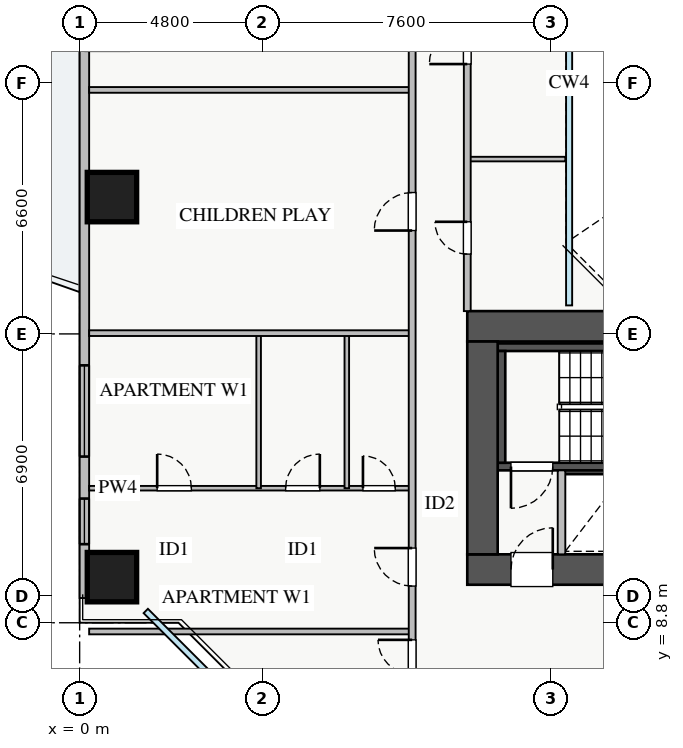
"""IFC4 building model, lengths in metres.
Left out: names, types, materials, properties, quantities, classifications, styles, units other than length and angle.
Written with IfcOpenShell. Run it as: python <this file> out.ifc"""

import sys

from ifc_helpers import new_model, si_unit, direction, frame, frame_2d, origin, origin_2d, place, context, subcontext, project, spatial, rectangle, extrude, source, transform, mapped, element, fill, save


model = new_model("IFC4")
c1 = context("Model", 3, precision=1e-05, world=origin(), true_north=direction((0.0, 1.0)))
c2 = subcontext(c1, "Body", "Model", "MODEL_VIEW")
j1 = project(units=[si_unit("LENGTHUNIT", "METRE"), si_unit("PLANEANGLEUNIT", "RADIAN")], contexts=[c1])
p1 = place(None, origin())
s1 = spatial("IfcSite", under=j1, at=p1, CompositionType="ELEMENT")
p2 = place(p1, origin())
s2 = spatial("IfcBuilding", under=s1, at=p2, CompositionType="ELEMENT")
p3 = place(p2, frame((0.0, 0.0, 60.0)))
s3 = spatial("IfcBuildingStorey", under=s2, at=p3, CompositionType="ELEMENT", Elevation=60.0)
p4 = place(p3, frame((12.68, 12.8, 0.0), z_axis=(0.0, 0.0, 1.0), x_axis=(1.0, 0.0, 0.0)))
e1 = element("IfcWall", 1, at=p4, inside=s3, PredefinedType="SHEAR", context=c2, shape_type="SweptSolid", body=[
    extrude(rectangle(XDim=1.94, YDim=0.18, at=frame_2d((0.97, 0.0))), origin(), (0.0, 0.0, 1.0), 3.07),
])
p5 = place(p3, frame((11.0, 12.91, 0.0), z_axis=(0.0, 0.0, 1.0), x_axis=(1.0, 0.0, 0.0)))
e2 = element("IfcWall", 2, at=p5, inside=s3, PredefinedType="SHEAR", context=c2, shape_type="SweptSolid", body=[
    extrude(rectangle(XDim=7.15, YDim=0.2, at=frame_2d((3.575, 0.0))), origin(), (0.0, 0.0, 1.0), 3.25),
])
p6 = place(p5, frame((0.35, 0.0, 0.0)))
e3 = element("IfcOpeningElement", 3, at=p6, cuts=e2, PredefinedType="OPENING", context=c2, shape_type="SweptSolid", body=[
    extrude(rectangle(XDim=1.1, YDim=2.05, at=frame_2d((0.55, 1.025))), frame((0.0, 0.11, 0.0), z_axis=(0.0, -1.0, 0.0), x_axis=(1.0, 0.0, 0.0)), (0.0, 0.0, 1.0), 0.22),
])
p7 = place(p3, frame((11.0, 16.05, 0.0), z_axis=(0.0, 0.0, 1.0), x_axis=(1.0, 0.0, 0.0)))
e4 = element("IfcWall", 4, at=p7, inside=s3, PredefinedType="SHEAR", context=c2, shape_type="SweptSolid", body=[
    extrude(rectangle(XDim=7.15, YDim=0.2, at=frame_2d((3.575, 0.0))), origin(), (0.0, 0.0, 1.0), 3.25),
])
p8 = place(p3, frame((11.1, 13.01, 0.0), z_axis=(0.0, 0.0, 1.0), x_axis=(0.0, 1.0, 0.0)))
e5 = element("IfcWall", 5, at=p8, inside=s3, PredefinedType="SHEAR", context=c2, shape_type="SweptSolid", body=[
    extrude(rectangle(XDim=2.94, YDim=0.2, at=frame_2d((1.47, 0.0))), origin(), (0.0, 0.0, 1.0), 3.25),
])
p9 = place(p3, frame((10.2, 10.2, 0.0), z_axis=(0.0, 0.0, 1.0), x_axis=(1.0, 0.0, 0.0)))
e6 = element("IfcWall", 6, at=p9, inside=s3, PredefinedType="SHEAR", context=c2, shape_type="SweptSolid", body=[
    extrude(rectangle(XDim=17.6, YDim=0.8, at=frame_2d((8.8, 0.0))), origin(), (0.0, 0.0, 1.0), 3.25),
])
p10 = place(p9, frame((1.15, 0.0, 0.0)))
e7 = element("IfcOpeningElement", 7, at=p10, cuts=e6, PredefinedType="OPENING", context=c2, shape_type="SweptSolid", body=[
    extrude(rectangle(XDim=1.1, YDim=2.05, at=frame_2d((0.55, 1.025))), frame((0.0, 0.41, 0.0), z_axis=(0.0, -1.0, 0.0), x_axis=(1.0, 0.0, 0.0)), (0.0, 0.0, 1.0), 0.82),
])
p11 = place(p9, frame((8.3, 0.0, 0.0)))
e8 = element("IfcOpeningElement", 8, at=p11, cuts=e6, PredefinedType="OPENING", context=c2, shape_type="SweptSolid", body=[
    extrude(rectangle(XDim=1.1, YDim=2.05, at=frame_2d((0.55, 1.025))), frame((0.0, 0.41, 0.0), z_axis=(0.0, -1.0, 0.0), x_axis=(1.0, 0.0, 0.0)), (0.0, 0.0, 1.0), 0.82),
])
p12 = place(p9, frame((10.05, 0.0, 0.0)))
e9 = element("IfcOpeningElement", 9, at=p12, cuts=e6, PredefinedType="OPENING", context=c2, shape_type="SweptSolid", body=[
    extrude(rectangle(XDim=1.1, YDim=2.05, at=frame_2d((0.55, 1.025))), frame((0.0, 0.41, 0.0), z_axis=(0.0, -1.0, 0.0), x_axis=(1.0, 0.0, 0.0)), (0.0, 0.0, 1.0), 0.82),
])
p13 = place(p9, frame((14.74, 0.0, 0.0)))
e10 = element("IfcOpeningElement", 10, at=p13, cuts=e6, PredefinedType="OPENING", context=c2, shape_type="SweptSolid", body=[
    extrude(rectangle(XDim=1.0, YDim=2.05, at=frame_2d((0.5, 1.025))), frame((0.0, 0.41, 0.0), z_axis=(0.0, -1.0, 0.0), x_axis=(1.0, 0.0, 0.0)), (0.0, 0.0, 1.0), 0.82),
])
p14 = place(p9, frame((12.585, 0.0, 0.0)))
e11 = element("IfcOpeningElement", 11, at=p14, cuts=e6, PredefinedType="OPENING", context=c2, shape_type="SweptSolid", body=[
    extrude(rectangle(XDim=1.0, YDim=2.05, at=frame_2d((0.5, 1.025))), frame((0.0, 0.41, 0.0), z_axis=(0.0, -1.0, 0.0), x_axis=(1.0, 0.0, 0.0)), (0.0, 0.0, 1.0), 0.82),
])
p15 = place(p3, frame((10.2, 16.6, 0.0), z_axis=(0.0, 0.0, 1.0), x_axis=(1.0, 0.0, 0.0)))
e12 = element("IfcWall", 12, at=p15, inside=s3, PredefinedType="SHEAR", context=c2, shape_type="SweptSolid", body=[
    extrude(rectangle(XDim=17.6, YDim=0.8, at=frame_2d((8.8, 0.0))), origin(), (0.0, 0.0, 1.0), 3.25),
])
p16 = place(p3, frame((10.6, 10.6, 0.0), z_axis=(0.0, 0.0, 1.0), x_axis=(0.0, 1.0, 0.0)))
e13 = element("IfcWall", 13, at=p16, inside=s3, PredefinedType="SHEAR", context=c2, shape_type="SweptSolid", body=[
    extrude(rectangle(XDim=5.6, YDim=0.8, at=frame_2d((2.8, 0.0))), origin(), (0.0, 0.0, 1.0), 3.25),
])
m1 = source(origin(), c2, "Body", "SweptSolid", [
    extrude(rectangle(XDim=1.3, YDim=1.3, at=origin_2d()), origin(), (0.0, 0.0, 1.0), 3.25),
])
for number, where, z_axis, x_axis in (
    (14, (0.85, 20.0, 0.0), (0.0, 0.0, 1.0), (1.0, 0.0, 0.0)),
    (15, (0.85, 10.0, 0.0), (0.0, 0.0, 1.0), (1.0, 0.0, 0.0)),
):
    element("IfcColumn", number, at=place(p3, frame(where, z_axis=z_axis, x_axis=x_axis)), inside=s3, PredefinedType="COLUMN", context=c2, shape_type="MappedRepresentation", body=[
        mapped(m1, transform((0.0, 0.0, 0.0), x_axis=(1.0, 0.0, 0.0), y_axis=(0.0, 1.0, 0.0), z_axis=(0.0, 0.0, 1.0), scale=1.0)),
    ])
p17 = place(p3, frame((0.125, 9.45, 0.0), z_axis=(0.0, 0.0, 1.0), x_axis=(0.0, 1.0, 0.0)))
e16 = element("IfcWall", 16, at=p17, inside=s3, PredefinedType="STANDARD", context=c2, shape_type="SweptSolid", body=[
    extrude(rectangle(XDim=27.1, YDim=0.25, at=frame_2d((13.55, 0.0))), origin(), (0.0, 0.0, 1.0), 2.61),
])
p18 = place(p17, frame((14.4, 0.0, 0.0)))
e17 = element("IfcOpeningElement", 17, at=p18, cuts=e16, PredefinedType="OPENING", context=c2, shape_type="SweptSolid", body=[
    extrude(rectangle(XDim=1.2, YDim=2.1, at=frame_2d((0.6, 1.05))), frame((0.0, 0.135, 0.0), z_axis=(0.0, -1.0, 0.0), x_axis=(1.0, 0.0, 0.0)), (0.0, 0.0, 1.0), 0.27),
])
p19 = place(p17, frame((1.417, 0.0, 0.9)))
e18 = element("IfcOpeningElement", 18, at=p19, cuts=e16, PredefinedType="OPENING", context=c2, shape_type="SweptSolid", body=[
    extrude(rectangle(XDim=1.2, YDim=1.4, at=frame_2d((0.6, 0.7))), frame((0.0, 0.135, 0.0), z_axis=(0.0, -1.0, 0.0), x_axis=(1.0, 0.0, 0.0)), (0.0, 0.0, 1.0), 0.27),
])
p20 = place(p17, frame((24.188, 0.0, 0.9)))
e19 = element("IfcOpeningElement", 19, at=p20, cuts=e16, PredefinedType="OPENING", context=c2, shape_type="SweptSolid", body=[
    extrude(rectangle(XDim=1.5, YDim=1.5, at=frame_2d((0.75, 0.75))), frame((0.0, 0.135, 0.0), z_axis=(0.0, -1.0, 0.0), x_axis=(1.0, 0.0, 0.0)), (0.0, 0.0, 1.0), 0.27),
])
p21 = place(p17, frame((3.722, 0.0, 0.9)))
e20 = element("IfcOpeningElement", 20, at=p21, cuts=e16, PredefinedType="OPENING", context=c2, shape_type="SweptSolid", body=[
    extrude(rectangle(XDim=2.4, YDim=1.5, at=frame_2d((1.2, 0.75))), frame((0.0, 0.135, 0.0), z_axis=(0.0, -1.0, 0.0), x_axis=(1.0, 0.0, 0.0)), (0.0, 0.0, 1.0), 0.27),
])
p22 = place(p17, frame((21.018, 0.0, 0.9)))
e21 = element("IfcOpeningElement", 21, at=p22, cuts=e16, PredefinedType="OPENING", context=c2, shape_type="SweptSolid", body=[
    extrude(rectangle(XDim=2.4, YDim=1.5, at=frame_2d((1.2, 0.75))), frame((0.0, 0.135, 0.0), z_axis=(0.0, -1.0, 0.0), x_axis=(1.0, 0.0, 0.0)), (0.0, 0.0, 1.0), 0.27),
])
p23 = place(p17, frame((18.6, 0.0, 0.9)))
e22 = element("IfcOpeningElement", 22, at=p23, cuts=e16, PredefinedType="OPENING", context=c2, shape_type="SweptSolid", body=[
    extrude(rectangle(XDim=0.9, YDim=1.2, at=frame_2d((0.45, 0.6))), frame((0.0, 0.135, 0.0), z_axis=(0.0, -1.0, 0.0), x_axis=(1.0, 0.0, 0.0)), (0.0, 0.0, 1.0), 0.27),
])
p24 = place(p3, frame((12.68, 10.6, 0.0), z_axis=(0.0, 0.0, 1.0), x_axis=(0.0, 1.0, 0.0)))
e23 = element("IfcWall", 23, at=p24, inside=s3, PredefinedType="PARTITIONING", context=c2, shape_type="SweptSolid", body=[
    extrude(rectangle(XDim=2.21, YDim=0.2, at=frame_2d((1.105, 0.0))), origin(), (0.0, 0.0, 1.0), 3.07),
])
p25 = place(p3, frame((0.25, 8.57, 0.0), z_axis=(0.0, 0.0, 1.0), x_axis=(1.0, 0.0, 0.0)))
e24 = element("IfcWall", 24, at=p25, inside=s3, PredefinedType="PARTITIONING", context=c2, shape_type="SweptSolid", body=[
    extrude(rectangle(XDim=8.5, YDim=0.15, at=frame_2d((4.25, 0.0))), origin(), (0.0, 0.0, 1.0), 3.07),
])
p26 = place(p3, frame((0.25, 12.34, 0.0), z_axis=(0.0, 0.0, 1.0), x_axis=(1.0, 0.0, 0.0)))
e25 = element("IfcWall", 25, at=p26, inside=s3, PredefinedType="PLUMBINGWALL", context=c2, shape_type="SweptSolid", body=[
    extrude(rectangle(XDim=8.5, YDim=0.12, at=frame_2d((4.25, 0.0))), origin(), (0.0, 0.0, 1.0), 3.07),
])
p27 = place(p26, frame((1.79, 0.0, 0.0)))
e26 = element("IfcOpeningElement", 26, at=p27, cuts=e25, PredefinedType="OPENING", context=c2, shape_type="SweptSolid", body=[
    extrude(rectangle(XDim=0.9, YDim=2.05, at=frame_2d((0.45, 1.025))), frame((0.0, 0.07, 0.0), z_axis=(0.0, -1.0, 0.0), x_axis=(1.0, 0.0, 0.0)), (0.0, 0.0, 1.0), 0.14),
])
p28 = place(p26, frame((5.17, 0.0, 0.0)))
e27 = element("IfcOpeningElement", 27, at=p28, cuts=e25, PredefinedType="OPENING", context=c2, shape_type="SweptSolid", body=[
    extrude(rectangle(XDim=0.9, YDim=2.05, at=frame_2d((0.45, 1.025))), frame((0.0, 0.07, 0.0), z_axis=(0.0, -1.0, 0.0), x_axis=(1.0, 0.0, 0.0)), (0.0, 0.0, 1.0), 0.14),
])
p29 = place(p26, frame((7.205, 0.0, 0.0)))
e28 = element("IfcOpeningElement", 28, at=p29, cuts=e25, PredefinedType="OPENING", context=c2, shape_type="SweptSolid", body=[
    extrude(rectangle(XDim=0.85, YDim=2.05, at=frame_2d((0.425, 1.025))), frame((0.0, 0.07, 0.0), z_axis=(0.0, -1.0, 0.0), x_axis=(1.0, 0.0, 0.0)), (0.0, 0.0, 1.0), 0.14),
])
for number, where, z_axis, x_axis in (
    (29, (4.71, 12.34, 0.0), (0.0, 0.0, 1.0), (0.0, 1.0, 0.0)),
    (30, (7.03, 12.34, 0.0), (0.0, 0.0, 1.0), (0.0, 1.0, 0.0)),
):
    element("IfcWall", number, at=place(p3, frame(where, z_axis=z_axis, x_axis=x_axis)), inside=s3, PredefinedType="PLUMBINGWALL", context=c2, shape_type="SweptSolid", body=[
        extrude(rectangle(XDim=4.08, YDim=0.12, at=frame_2d((2.04, 0.0))), origin(), (0.0, 0.0, 1.0), 3.07),
    ])
for number, where, z_axis, x_axis in (
    (31, (0.25, 16.42, 0.0), (0.0, 0.0, 1.0), (1.0, 0.0, 0.0)),
    (32, (0.25, 22.82, 0.0), (0.0, 0.0, 1.0), (1.0, 0.0, 0.0)),
):
    element("IfcWall", number, at=place(p3, frame(where, z_axis=z_axis, x_axis=x_axis)), inside=s3, PredefinedType="PARTITIONING", context=c2, shape_type="SweptSolid", body=[
        extrude(rectangle(XDim=8.5, YDim=0.15, at=frame_2d((4.25, 0.0))), origin(), (0.0, 0.0, 1.0), 3.07),
    ])
p30 = place(p3, frame((8.75, 7.21, 0.0), z_axis=(0.0, 0.0, 1.0), x_axis=(0.0, 1.0, 0.0)))
e33 = element("IfcWall", 33, at=p30, inside=s3, PredefinedType="PARTITIONING", context=c2, shape_type="SweptSolid", body=[
    extrude(rectangle(XDim=31.23, YDim=0.18, at=frame_2d((15.615, 0.0))), origin(), (0.0, 0.0, 1.0), 3.07),
])
p31 = place(p30, frame((30.09, 0.0, 0.0)))
e34 = element("IfcOpeningElement", 34, at=p31, cuts=e33, PredefinedType="OPENING", context=c2, shape_type="SweptSolid", body=[
    extrude(rectangle(XDim=0.9, YDim=2.05, at=frame_2d((0.45, 1.025))), frame((0.0, 0.1, 0.0), z_axis=(0.0, -1.0, 0.0), x_axis=(1.0, 0.0, 0.0)), (0.0, 0.0, 1.0), 0.2),
])
p32 = place(p30, frame((0.24, 0.0, 0.0)))
e35 = element("IfcOpeningElement", 35, at=p32, cuts=e33, PredefinedType="OPENING", context=c2, shape_type="SweptSolid", body=[
    extrude(rectangle(XDim=0.9, YDim=2.05, at=frame_2d((0.45, 1.025))), frame((0.0, 0.1, 0.0), z_axis=(0.0, -1.0, 0.0), x_axis=(1.0, 0.0, 0.0)), (0.0, 0.0, 1.0), 0.2),
])
p33 = place(p30, frame((2.555, 0.0, 0.0)))
e36 = element("IfcOpeningElement", 36, at=p33, cuts=e33, PredefinedType="OPENING", context=c2, shape_type="SweptSolid", body=[
    extrude(rectangle(XDim=1.0, YDim=2.05, at=frame_2d((0.5, 1.025))), frame((0.0, 0.1, 0.0), z_axis=(0.0, -1.0, 0.0), x_axis=(1.0, 0.0, 0.0)), (0.0, 0.0, 1.0), 0.2),
])
p34 = place(p30, frame((11.91, 0.0, 0.0)))
e37 = element("IfcOpeningElement", 37, at=p34, cuts=e33, PredefinedType="OPENING", context=c2, shape_type="SweptSolid", body=[
    extrude(rectangle(XDim=1.0, YDim=2.05, at=frame_2d((0.5, 1.025))), frame((0.0, 0.1, 0.0), z_axis=(0.0, -1.0, 0.0), x_axis=(1.0, 0.0, 0.0)), (0.0, 0.0, 1.0), 0.2),
])
p35 = place(p30, frame((17.425, 0.0, 0.0)))
e38 = element("IfcOpeningElement", 38, at=p35, cuts=e33, PredefinedType="OPENING", context=c2, shape_type="SweptSolid", body=[
    extrude(rectangle(XDim=1.0, YDim=2.05, at=frame_2d((0.5, 1.025))), frame((0.0, 0.1, 0.0), z_axis=(0.0, -1.0, 0.0), x_axis=(1.0, 0.0, 0.0)), (0.0, 0.0, 1.0), 0.2),
])
p36 = place(p30, frame((23.76, 0.0, 0.0)))
e39 = element("IfcOpeningElement", 39, at=p36, cuts=e33, PredefinedType="OPENING", context=c2, shape_type="SweptSolid", body=[
    extrude(rectangle(XDim=1.0, YDim=2.05, at=frame_2d((0.5, 1.025))), frame((0.0, 0.1, 0.0), z_axis=(0.0, -1.0, 0.0), x_axis=(1.0, 0.0, 0.0)), (0.0, 0.0, 1.0), 0.2),
])
p37 = place(p3, frame((10.2, 21.0, 0.0), z_axis=(0.0, 0.0, 1.0), x_axis=(1.0, 0.0, 0.0)))
e40 = element("IfcWall", 40, at=p37, inside=s3, PredefinedType="PLUMBINGWALL", context=c2, shape_type="SweptSolid", body=[
    extrude(rectangle(XDim=2.58, YDim=0.12, at=frame_2d((1.29, 0.0))), origin(), (0.0, 0.0, 1.0), 3.07),
])
p38 = place(p3, frame((10.2, 17.0, 0.0), z_axis=(0.0, 0.0, 1.0), x_axis=(0.0, 1.0, 0.0)))
e41 = element("IfcWall", 41, at=p38, inside=s3, PredefinedType="PARTITIONING", context=c2, shape_type="SweptSolid", body=[
    extrude(rectangle(XDim=12.0, YDim=0.18, at=frame_2d((6.0, 0.0))), origin(), (0.0, 0.0, 1.0), 3.07),
])
p39 = place(p38, frame((1.5, 0.0, 0.0)))
e42 = element("IfcOpeningElement", 42, at=p39, cuts=e41, PredefinedType="OPENING", context=c2, shape_type="SweptSolid", body=[
    extrude(rectangle(XDim=0.85, YDim=2.05, at=frame_2d((0.425, 1.025))), frame((0.0, 0.1, 0.0), z_axis=(0.0, -1.0, 0.0), x_axis=(1.0, 0.0, 0.0)), (0.0, 0.0, 1.0), 0.2),
])
p40 = place(p38, frame((6.5, 0.0, 0.0)))
e43 = element("IfcOpeningElement", 43, at=p40, cuts=e41, PredefinedType="OPENING", context=c2, shape_type="SweptSolid", body=[
    extrude(rectangle(XDim=1.0, YDim=2.05, at=frame_2d((0.5, 1.025))), frame((0.0, 0.1, 0.0), z_axis=(0.0, -1.0, 0.0), x_axis=(1.0, 0.0, 0.0)), (0.0, 0.0, 1.0), 0.2),
])
m2 = source(origin(), c2, "Body", "SweptSolid", [
    extrude(rectangle(XDim=1.2, YDim=1.4, at=frame_2d((0.6, 0.7))), frame((0.0, 0.03, 0.0), z_axis=(0.0, -1.0, 0.0), x_axis=(1.0, 0.0, 0.0)), (0.0, 0.0, 1.0), 0.06),
])
p41 = place(p19, origin())
e44 = element("IfcWindow", 44, at=p41, inside=s3, PartitioningType="TRIPLE_PANEL_VERTICAL", PredefinedType="WINDOW", context=c2, shape_type="MappedRepresentation", body=[
    mapped(m2, transform((0.0, 0.0, 0.0), x_axis=(1.0, 0.0, 0.0), y_axis=(0.0, 1.0, 0.0), z_axis=(0.0, 0.0, 1.0), scale=1.0)),
])
fill(e18, e44)
m3 = source(origin(), c2, "Body", "SweptSolid", [
    extrude(rectangle(XDim=1.1, YDim=2.05, at=frame_2d((0.55, 1.025))), frame((0.0, 0.025, 0.0), z_axis=(0.0, -1.0, 0.0), x_axis=(1.0, 0.0, 0.0)), (0.0, 0.0, 1.0), 0.05),
])
p42 = place(p10, origin())
e45 = element("IfcDoor", 45, at=p42, inside=s3, OperationType="SINGLE_SWING_RIGHT", PredefinedType="DOOR", context=c2, shape_type="MappedRepresentation", body=[
    mapped(m3, transform((0.0, 0.0, 0.0), x_axis=(1.0, 0.0, 0.0), y_axis=(0.0, 1.0, 0.0), z_axis=(0.0, 0.0, 1.0), scale=1.0)),
])
fill(e7, e45)
p43 = place(p6, frame((1.1, 0.0, 0.0), z_axis=(0.0, 0.0, 1.0), x_axis=(-1.0, 0.0, 0.0)))
e46 = element("IfcDoor", 46, at=p43, inside=s3, OperationType="SINGLE_SWING_LEFT", PredefinedType="DOOR", context=c2, shape_type="MappedRepresentation", body=[
    mapped(m3, transform((0.0, 0.0, 0.0), x_axis=(1.0, 0.0, 0.0), y_axis=(0.0, 1.0, 0.0), z_axis=(0.0, 0.0, 1.0), scale=1.0)),
])
fill(e3, e46)
m4 = source(origin(), c2, "Body", "SweptSolid", [
    extrude(rectangle(XDim=0.9, YDim=2.05, at=frame_2d((0.45, 1.025))), frame((0.0, 0.025, 0.0), z_axis=(0.0, -1.0, 0.0), x_axis=(1.0, 0.0, 0.0)), (0.0, 0.0, 1.0), 0.05),
])
p44 = place(p27, origin())
e47 = element("IfcDoor", 47, at=p44, inside=s3, OperationType="SINGLE_SWING_LEFT", PredefinedType="DOOR", context=c2, shape_type="MappedRepresentation", body=[
    mapped(m4, transform((0.0, 0.0, 0.0), x_axis=(1.0, 0.0, 0.0), y_axis=(0.0, 1.0, 0.0), z_axis=(0.0, 0.0, 1.0), scale=1.0)),
])
fill(e26, e47)
p45 = place(p28, origin())
e48 = element("IfcDoor", 48, at=p45, inside=s3, OperationType="SINGLE_SWING_RIGHT", PredefinedType="DOOR", context=c2, shape_type="MappedRepresentation", body=[
    mapped(m4, transform((0.0, 0.0, 0.0), x_axis=(1.0, 0.0, 0.0), y_axis=(0.0, 1.0, 0.0), z_axis=(0.0, 0.0, 1.0), scale=1.0)),
])
fill(e27, e48)
m5 = source(origin(), c2, "Body", "SweptSolid", [
    extrude(rectangle(XDim=0.85, YDim=2.05, at=frame_2d((0.425, 1.025))), frame((0.0, 0.025, 0.0), z_axis=(0.0, -1.0, 0.0), x_axis=(1.0, 0.0, 0.0)), (0.0, 0.0, 1.0), 0.05),
])
p46 = place(p29, origin())
e49 = element("IfcDoor", 49, at=p46, inside=s3, OperationType="SINGLE_SWING_LEFT", PredefinedType="DOOR", context=c2, shape_type="MappedRepresentation", body=[
    mapped(m5, transform((0.0, 0.0, 0.0), x_axis=(1.0, 0.0, 0.0), y_axis=(0.0, 1.0, 0.0), z_axis=(0.0, 0.0, 1.0), scale=1.0)),
])
fill(e28, e49)
p47 = place(p32, origin())
e50 = element("IfcDoor", 50, at=p47, inside=s3, OperationType="SINGLE_SWING_RIGHT", PredefinedType="DOOR", context=c2, shape_type="MappedRepresentation", body=[
    mapped(m4, transform((0.0, 0.0, 0.0), x_axis=(1.0, 0.0, 0.0), y_axis=(0.0, 1.0, 0.0), z_axis=(0.0, 0.0, 1.0), scale=1.0)),
])
fill(e35, e50)
m6 = source(origin(), c2, "Body", "SweptSolid", [
    extrude(rectangle(XDim=1.0, YDim=2.05, at=frame_2d((0.5, 1.025))), frame((0.0, 0.025, 0.0), z_axis=(0.0, -1.0, 0.0), x_axis=(1.0, 0.0, 0.0)), (0.0, 0.0, 1.0), 0.05),
])
p48 = place(p33, origin())
e51 = element("IfcDoor", 51, at=p48, inside=s3, OperationType="SINGLE_SWING_RIGHT", PredefinedType="DOOR", context=c2, shape_type="MappedRepresentation", body=[
    mapped(m6, transform((0.0, 0.0, 0.0), x_axis=(1.0, 0.0, 0.0), y_axis=(0.0, 1.0, 0.0), z_axis=(0.0, 0.0, 1.0), scale=1.0)),
])
fill(e36, e51)
p49 = place(p34, origin())
e52 = element("IfcDoor", 52, at=p49, inside=s3, OperationType="SINGLE_SWING_LEFT", PredefinedType="DOOR", context=c2, shape_type="MappedRepresentation", body=[
    mapped(m6, transform((0.0, 0.0, 0.0), x_axis=(1.0, 0.0, 0.0), y_axis=(0.0, 1.0, 0.0), z_axis=(0.0, 0.0, 1.0), scale=1.0)),
])
fill(e37, e52)
p50 = place(p39, origin())
e53 = element("IfcDoor", 53, at=p50, inside=s3, OperationType="SINGLE_SWING_RIGHT", PredefinedType="DOOR", context=c2, shape_type="MappedRepresentation", body=[
    mapped(m5, transform((0.0, 0.0, 0.0), x_axis=(1.0, 0.0, 0.0), y_axis=(0.0, 1.0, 0.0), z_axis=(0.0, 0.0, 1.0), scale=1.0)),
])
fill(e42, e53)
p51 = place(p40, origin())
e54 = element("IfcDoor", 54, at=p51, inside=s3, OperationType="SINGLE_SWING_LEFT", PredefinedType="DOOR", context=c2, shape_type="MappedRepresentation", body=[
    mapped(m6, transform((0.0, 0.0, 0.0), x_axis=(1.0, 0.0, 0.0), y_axis=(0.0, 1.0, 0.0), z_axis=(0.0, 0.0, 1.0), scale=1.0)),
])
fill(e43, e54)
m7 = source(origin(), c2, "Body", "SweptSolid", [
    extrude(rectangle(XDim=2.4, YDim=1.5, at=frame_2d((1.2, 0.75))), frame((0.0, 0.03, 0.0), z_axis=(0.0, -1.0, 0.0), x_axis=(1.0, 0.0, 0.0)), (0.0, 0.0, 1.0), 0.06),
])
p52 = place(p21, origin())
e55 = element("IfcWindow", 55, at=p52, inside=s3, PartitioningType="TRIPLE_PANEL_VERTICAL", PredefinedType="WINDOW", context=c2, shape_type="MappedRepresentation", body=[
    mapped(m7, transform((0.0, 0.0, 0.0), x_axis=(1.0, 0.0, 0.0), y_axis=(0.0, 1.0, 0.0), z_axis=(0.0, 0.0, 1.0), scale=1.0)),
])
fill(e20, e55)
save(model, sys.argv[1])
